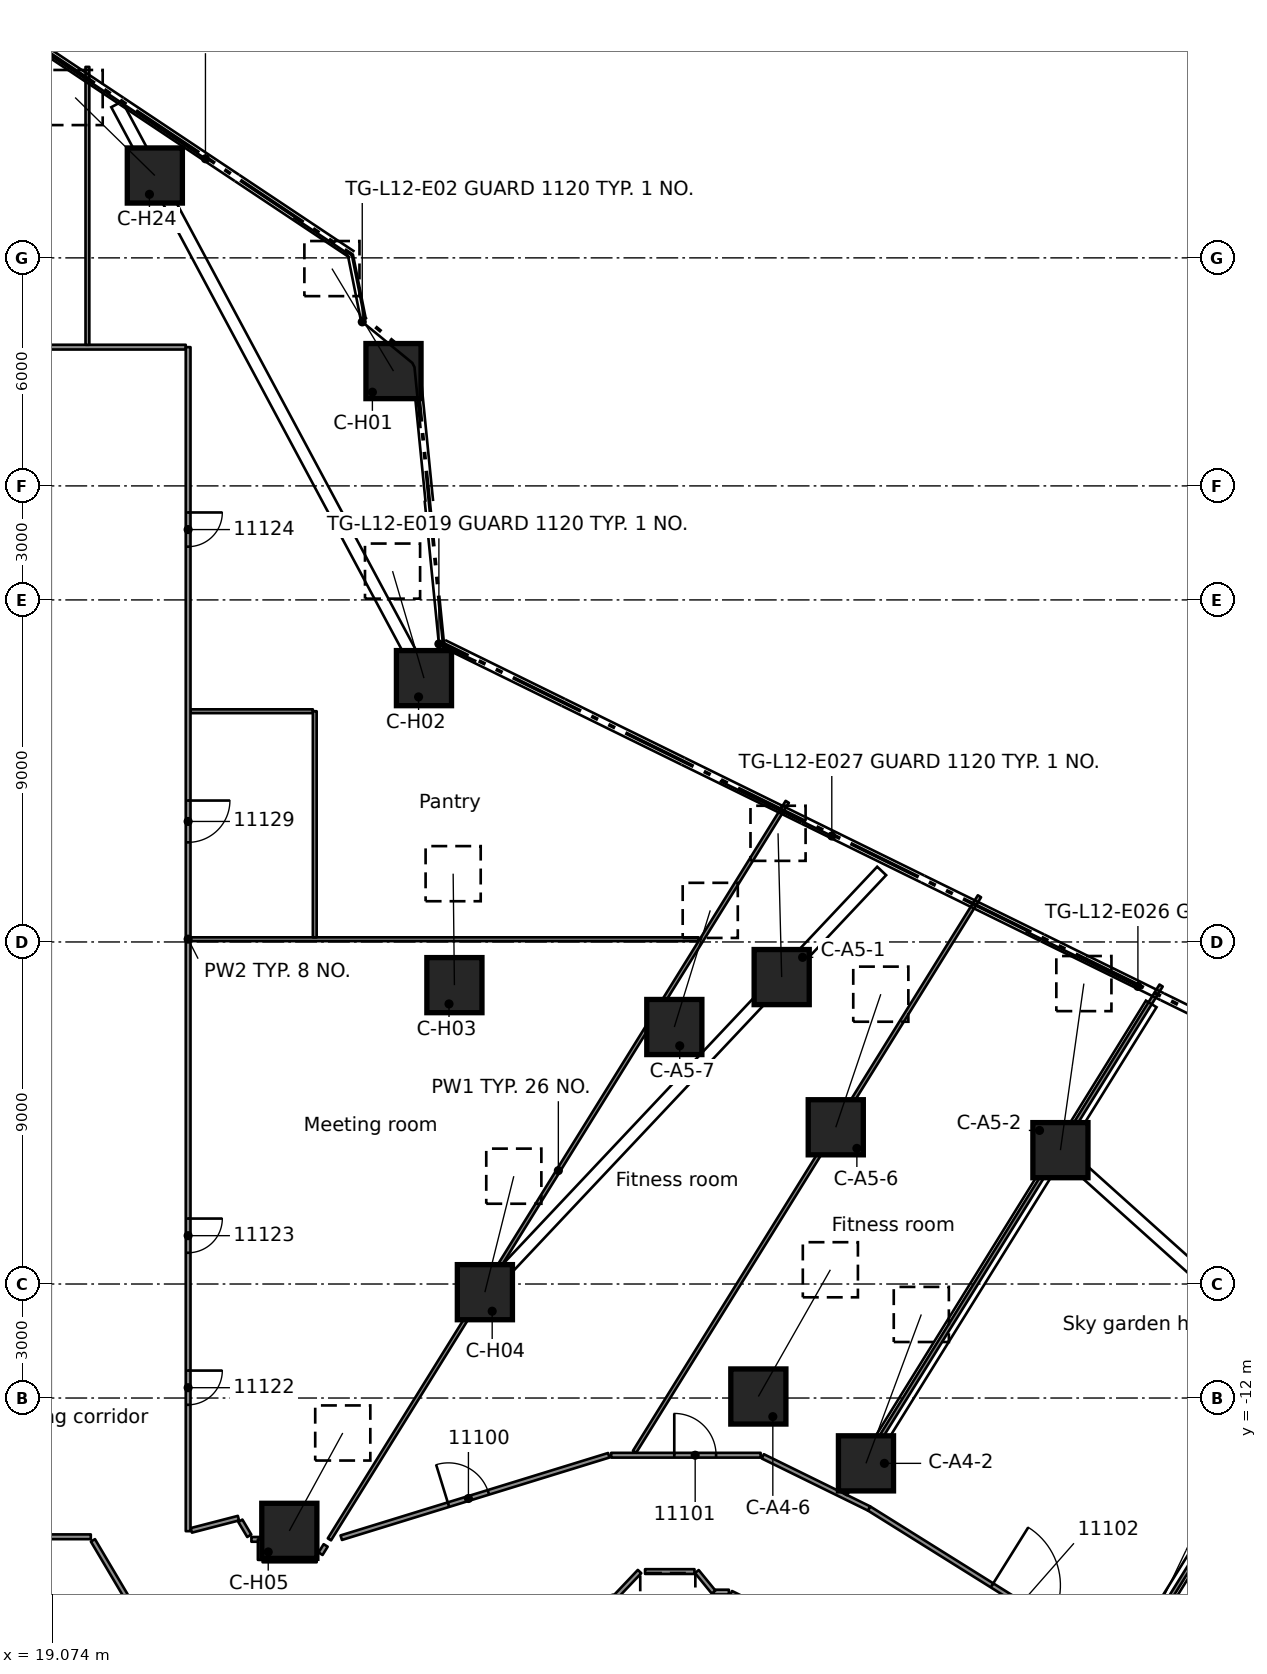
"""IFC4 building model, lengths in metres.
Left out: names, types, materials, properties, quantities, classifications, styles, units other than length and angle.
Written with IfcOpenShell. Run it as: python <this file> out.ifc"""

import sys

from ifc_helpers import new_model, si_unit, direction, frame, frame_2d, origin, origin_2d, place, context, subcontext, project, spatial, rectangle, extrude, element, fill, save


model = new_model("IFC4")
c1 = context("Model", 3, precision=1e-05, world=origin(), true_north=direction((0.0, 1.0)))
c2 = subcontext(c1, "Body", "Model", "MODEL_VIEW")
j1 = project(units=[si_unit("LENGTHUNIT", "METRE"), si_unit("PLANEANGLEUNIT", "RADIAN")], contexts=[c1])
p1 = place(None, origin())
s1 = spatial("IfcSite", under=j1, at=p1, CompositionType="ELEMENT")
p2 = place(p1, origin())
s2 = spatial("IfcBuilding", under=s1, at=p2, CompositionType="ELEMENT")
p3 = place(p2, frame((0.0, 0.0, 54.8)))
s3 = spatial("IfcBuildingStorey", under=s2, at=p3, CompositionType="ELEMENT", Elevation=54.8)
p4 = place(p3, frame((32.539, -20.201, 0.591), z_axis=(0.561988017013, 0.590152683579, 0.579559555869), x_axis=(-0.724176021498, 0.689615175215, 0.0)))
e1 = element("IfcColumn", 1, at=p4, inside=s3, PredefinedType="COLUMN", context=c2, shape_type="SweptSolid", body=[
    extrude(rectangle(XDim=1.45, YDim=1.45, at=origin_2d()), origin(), (0.0, 0.0, 1.0), 4.863),
])
p5 = place(p3, frame((40.487, -13.719, 0.603), z_axis=(0.289589157481, 0.779229845617, 0.55582278432), x_axis=(-0.937362069968, 0.348356641656, 0.0)))
e2 = element("IfcColumn", 2, at=p5, inside=s3, PredefinedType="COLUMN", context=c2, shape_type="SweptSolid", body=[
    extrude(rectangle(XDim=1.45, YDim=1.45, at=origin_2d()), origin(), (0.0, 0.0, 1.0), 5.028),
])
p6 = place(p3, frame((47.822, -18.272, 0.637), z_axis=(0.380217041429, 0.791847782589, 0.47792477506), x_axis=(-0.901465266599, 0.432851444626, 0.0)))
e3 = element("IfcColumn", 3, at=p6, inside=s3, PredefinedType="COLUMN", context=c2, shape_type="SweptSolid", body=[
    extrude(rectangle(XDim=1.45, YDim=1.45, at=origin_2d()), origin(), (0.0, 0.0, 1.0), 5.705),
])
p7 = place(p3, frame((37.655, -11.96, 0.583), z_axis=(0.397363899907, 0.699303127123, 0.594202884079), x_axis=(-0.86943915975, 0.494040026206, 0.0)))
e4 = element("IfcColumn", 4, at=p7, inside=s3, PredefinedType="COLUMN", context=c2, shape_type="SweptSolid", body=[
    extrude(rectangle(XDim=1.45, YDim=1.45, at=origin_2d()), origin(), (0.0, 0.0, 1.0), 4.769),
])
p8 = place(p3, frame((38.269, -0.924, 0.58), z_axis=(-0.020278232031, 0.799519606433, 0.600297586398), x_axis=(-0.999678513697, -0.025354866465, 0.0)))
e5 = element("IfcColumn", 5, at=p8, inside=s3, PredefinedType="COLUMN", context=c2, shape_type="SweptSolid", body=[
    extrude(rectangle(XDim=1.45, YDim=1.45, at=origin_2d()), origin(), (0.0, 0.0, 1.0), 4.731),
])
p9 = place(p3, frame((45.604, -5.478, 0.615), z_axis=(0.118141081309, 0.839329969429, 0.530629708295), x_axis=(-0.990238625022, 0.139382443348, 0.0)))
e6 = element("IfcColumn", 6, at=p9, inside=s3, PredefinedType="COLUMN", context=c2, shape_type="SweptSolid", body=[
    extrude(rectangle(XDim=1.45, YDim=1.45, at=origin_2d()), origin(), (0.0, 0.0, 1.0), 5.222),
])
p10 = place(p3, frame((39.692, -4.876, 0.574), z_axis=(0.253806770761, 0.75002149151, 0.610778098322), x_axis=(-0.947233862159, 0.320543305, 0.0)))
e7 = element("IfcColumn", 7, at=p10, inside=s3, PredefinedType="COLUMN", context=c2, shape_type="SweptSolid", body=[
    extrude(rectangle(XDim=1.45, YDim=1.45, at=origin_2d()), origin(), (0.0, 0.0, 1.0), 4.669),
])
p11 = place(p3, frame((35.444, -2.238, 0.536), z_axis=(0.217391389065, 0.706156886805, 0.673857132616), x_axis=(-0.955736259088, 0.294224749238, 0.0)))
e8 = element("IfcColumn", 8, at=p11, inside=s3, PredefinedType="COLUMN", context=c2, shape_type="SweptSolid", body=[
    extrude(rectangle(XDim=1.45, YDim=1.45, at=origin_2d()), origin(), (0.0, 0.0, 1.0), 4.346),
])
p12 = place(p3, frame((28.054, 15.021, 0.53), z_axis=(-0.376150796059, 0.626275485165, 0.682854007315), x_axis=(-0.857260034443, -0.514883708566, 0.0)))
e9 = element("IfcColumn", 9, at=p12, inside=s3, PredefinedType="COLUMN", context=c2, shape_type="SweptSolid", body=[
    extrude(rectangle(XDim=1.45, YDim=1.45, at=origin_2d()), origin(), (0.0, 0.0, 1.0), 4.306),
])
p13 = place(p3, frame((28.856, 6.942, 0.509), z_axis=(-0.197598545942, 0.672955189678, 0.712801604464), x_axis=(-0.959492559791, -0.281733966191, 0.0)))
e10 = element("IfcColumn", 10, at=p13, inside=s3, PredefinedType="COLUMN", context=c2, shape_type="SweptSolid", body=[
    extrude(rectangle(XDim=1.45, YDim=1.45, at=origin_2d()), origin(), (0.0, 0.0, 1.0), 4.185),
])
p14 = place(p3, frame((29.657, -1.136, 0.508), z_axis=(-0.007877610375, 0.701048970737, 0.713069620643), x_axis=(-0.999936872126, -0.011236180934, 0.0)))
e11 = element("IfcColumn", 11, at=p14, inside=s3, PredefinedType="COLUMN", context=c2, shape_type="SweptSolid", body=[
    extrude(rectangle(XDim=1.45, YDim=1.45, at=origin_2d()), origin(), (0.0, 0.0, 1.0), 4.184),
])
p15 = place(p3, frame((30.459, -9.215, 0.53), z_axis=(0.176721352289, 0.708756376313, 0.682959707948), x_axis=(-0.970292981686, 0.241932903281, 0.0)))
e12 = element("IfcColumn", 12, at=p15, inside=s3, PredefinedType="COLUMN", context=c2, shape_type="SweptSolid", body=[
    extrude(rectangle(XDim=1.45, YDim=1.45, at=origin_2d()), origin(), (0.0, 0.0, 1.0), 4.306),
])
p16 = place(p3, frame((25.313, -15.495, 0.508), z_axis=(0.336025835882, 0.61545416164, 0.71295358372), x_axis=(-0.877701520343, 0.479207722379, 0.0)))
e13 = element("IfcColumn", 13, at=p16, inside=s3, PredefinedType="COLUMN", context=c2, shape_type="SweptSolid", body=[
    extrude(rectangle(XDim=1.45, YDim=1.45, at=origin_2d()), origin(), (0.0, 0.0, 1.0), 4.184),
])
p17 = place(p3, frame((21.774, 20.167, 0.508), z_axis=(-0.501160289027, 0.490424057431, 0.712967466716), x_axis=(-0.699409692761, -0.714720981693, 0.0)))
e14 = element("IfcColumn", 14, at=p17, inside=s3, PredefinedType="COLUMN", context=c2, shape_type="SweptSolid", body=[
    extrude(rectangle(XDim=1.45, YDim=1.45, at=origin_2d()), origin(), (0.0, 0.0, 1.0), 4.184),
])
p18 = place(p3, frame((20.145, -15.745, 0.0), z_axis=(0.0, 0.0, 1.0), x_axis=(0.509399422691, -0.860530201772, 0.0)))
e15 = element("IfcWall", 15, at=p18, inside=s3, PredefinedType="PARTITIONING", context=c2, shape_type="SweptSolid", body=[
    extrude(rectangle(XDim=3.571, YDim=0.125, at=frame_2d((1.786, 0.0))), origin(), (0.0, 0.0, 1.0), 3.58),
])
p19 = place(p3, frame((24.024, -15.23, 0.0), z_axis=(0.0, 0.0, 1.0), x_axis=(0.511446511309, -0.859315114536, 0.0)))
e16 = element("IfcWall", 16, at=p19, inside=s3, PredefinedType="PARTITIONING", context=c2, shape_type="SweptSolid", body=[
    extrude(rectangle(XDim=0.46, YDim=0.125, at=frame_2d((0.23, 0.0))), origin(), (0.0, 0.0, 1.0), 3.58),
])
p20 = place(p3, frame((40.567, -14.906, 0.0), z_axis=(0.0, 0.0, 1.0), x_axis=(0.847984152338, -0.530021581998, 0.0)))
e17 = element("IfcWall", 17, at=p20, inside=s3, PredefinedType="PARTITIONING", context=c2, shape_type="SweptSolid", body=[
    extrude(rectangle(XDim=6.784, YDim=0.125, at=frame_2d((3.392, 0.0))), origin(), (0.0, 0.0, 1.0), 3.58),
])
p21 = place(p20, frame((3.817, 0.0, 0.0)))
e18 = element("IfcOpeningElement", 18, at=p21, cuts=e17, PredefinedType="OPENING", context=c2, shape_type="SweptSolid", body=[
    extrude(rectangle(XDim=1.8, YDim=2.1, at=frame_2d((0.9, 1.05))), frame((0.0, 0.073, 0.0), z_axis=(0.0, -1.0, 0.0), x_axis=(1.0, 0.0, 0.0)), (0.0, 0.0, 1.0), 0.145),
])
p22 = place(p3, frame((36.935, -17.134, 0.0), z_axis=(0.0, 0.0, 1.0), x_axis=(0.897608509631, -0.440793561022, 0.0)))
e19 = element("IfcWall", 19, at=p22, inside=s3, PredefinedType="PARTITIONING", context=c2, shape_type="SweptSolid", body=[
    extrude(rectangle(XDim=1.188, YDim=0.125, at=frame_2d((0.594, 0.0))), origin(), (0.0, 0.0, 1.0), 3.58),
])
p23 = place(p3, frame((37.771, -13.534, 0.0), z_axis=(0.0, 0.0, 1.0), x_axis=(0.897726238761, -0.440553742738, 0.0)))
e20 = element("IfcWall", 20, at=p23, inside=s3, PredefinedType="PARTITIONING", context=c2, shape_type="SweptSolid", body=[
    extrude(rectangle(XDim=3.115, YDim=0.125, at=frame_2d((1.557, 0.0))), origin(), (0.0, 0.0, 1.0), 3.58),
])
p24 = place(p3, frame((36.477, -17.106, 0.0), z_axis=(0.0, 0.0, 1.0), x_axis=(1.0, 0.0, 0.0)))
e21 = element("IfcWall", 21, at=p24, inside=s3, PredefinedType="PARTITIONING", context=c2, shape_type="SweptSolid", body=[
    extrude(rectangle(XDim=0.402, YDim=0.125, at=frame_2d((0.201, 0.0))), origin(), (0.0, 0.0, 1.0), 3.58),
])
p25 = place(p3, frame((34.674, -16.566, 0.0), z_axis=(0.0, 0.0, 1.0), x_axis=(1.0, 0.0, 0.0)))
e22 = element("IfcWall", 22, at=p25, inside=s3, PredefinedType="PARTITIONING", context=c2, shape_type="SweptSolid", body=[
    extrude(rectangle(XDim=1.3, YDim=0.125, at=frame_2d((0.65, 0.0))), origin(), (0.0, 0.0, 1.0), 3.58),
])
p26 = place(p3, frame((24.61, -16.259, 0.0), z_axis=(0.0, 0.0, 1.0), x_axis=(1.0, 0.0, 0.0)))
e23 = element("IfcWall", 23, at=p26, inside=s3, PredefinedType="PARTITIONING", context=c2, shape_type="SweptSolid", body=[
    extrude(rectangle(XDim=1.423, YDim=0.125, at=frame_2d((0.711, 0.0))), origin(), (0.0, 0.0, 1.0), 3.58),
])
p27 = place(p3, frame((24.315, -15.719, 0.0), z_axis=(0.0, 0.0, 1.0), x_axis=(1.0, 0.0, 0.0)))
e24 = element("IfcWall", 24, at=p27, inside=s3, PredefinedType="PARTITIONING", context=c2, shape_type="SweptSolid", body=[
    extrude(rectangle(XDim=0.233, YDim=0.125, at=frame_2d((0.117, 0.0))), origin(), (0.0, 0.0, 1.0), 3.58),
])
p28 = place(p3, frame((20.089, -15.651, 0.0), z_axis=(0.0, 0.0, 1.0), x_axis=(-1.0, 0.0, 0.0)))
e25 = element("IfcWall", 25, at=p28, inside=s3, PredefinedType="PARTITIONING", context=c2, shape_type="SweptSolid", body=[
    extrude(rectangle(XDim=7.928, YDim=0.125, at=frame_2d((3.964, 0.0))), origin(), (0.0, 0.0, 1.0), 3.58),
])
p29 = place(p28, frame((3.1, 0.0, 0.0)))
e26 = element("IfcOpeningElement", 26, at=p29, cuts=e25, PredefinedType="OPENING", context=c2, shape_type="SweptSolid", body=[
    extrude(rectangle(XDim=1.8, YDim=2.1, at=frame_2d((0.9, 1.05))), frame((0.0, 0.073, 0.0), z_axis=(0.0, -1.0, 0.0), x_axis=(1.0, 0.0, 0.0)), (0.0, 0.0, 1.0), 0.145),
])
p30 = place(p3, frame((33.782, -13.505, 0.0), z_axis=(0.0, 0.0, 1.0), x_axis=(1.0, 0.0, 0.0)))
e27 = element("IfcWall", 27, at=p30, inside=s3, PredefinedType="PARTITIONING", context=c2, shape_type="SweptSolid", body=[
    extrude(rectangle(XDim=3.933, YDim=0.125, at=frame_2d((1.967, 0.0))), origin(), (0.0, 0.0, 1.0), 3.58),
])
p31 = place(p30, frame((1.66, 0.0, 0.0)))
e28 = element("IfcOpeningElement", 28, at=p31, cuts=e27, PredefinedType="OPENING", context=c2, shape_type="SweptSolid", body=[
    extrude(rectangle(XDim=1.1, YDim=2.1, at=frame_2d((0.55, 1.05))), frame((0.0, 0.073, 0.0), z_axis=(0.0, -1.0, 0.0), x_axis=(1.0, 0.0, 0.0)), (0.0, 0.0, 1.0), 0.145),
])
p32 = place(p3, frame((22.712, 0.072, 0.0), z_axis=(0.0, 0.0, 1.0), x_axis=(1.0, 0.0, 0.0)))
e29 = element("IfcWall", 29, at=p32, inside=s3, PredefinedType="PARTITIONING", context=c2, shape_type="SweptSolid", body=[
    extrude(rectangle(XDim=13.37, YDim=0.1, at=frame_2d((6.685, 0.0))), origin(), (0.0, 0.0, 1.0), 3.58),
])
p33 = place(p3, frame((22.712, 6.071, 0.0), z_axis=(0.0, 0.0, 1.0), x_axis=(1.0, 0.0, 0.0)))
e30 = element("IfcWall", 30, at=p33, inside=s3, PredefinedType="PARTITIONING", context=c2, shape_type="SweptSolid", body=[
    extrude(rectangle(XDim=3.22, YDim=0.1, at=frame_2d((1.61, 0.0))), origin(), (0.0, 0.0, 1.0), 3.58),
])
p34 = place(p3, frame((12.311, 15.651, 0.0), z_axis=(0.0, 0.0, 1.0), x_axis=(1.0, 0.0, 0.0)))
e31 = element("IfcWall", 31, at=p34, inside=s3, PredefinedType="PARTITIONING", context=c2, shape_type="SweptSolid", body=[
    extrude(rectangle(XDim=10.276, YDim=0.125, at=frame_2d((5.138, 0.0))), origin(), (0.0, 0.0, 1.0), 3.58),
])
p35 = place(p3, frame((22.735, -15.482, 0.0), z_axis=(0.0, 0.0, 1.0), x_axis=(0.968031213417, 0.250829762688, 0.0)))
e32 = element("IfcWall", 32, at=p35, inside=s3, PredefinedType="PARTITIONING", context=c2, shape_type="SweptSolid", body=[
    extrude(rectangle(XDim=1.28, YDim=0.125, at=frame_2d((0.64, 0.0))), origin(), (0.0, 0.0, 1.0), 3.58),
])
p36 = place(p3, frame((31.596, -17.928, 0.0), z_axis=(0.0, 0.0, 1.0), x_axis=(0.95559332345, 0.294688649557, 0.0)))
e33 = element("IfcWall", 33, at=p36, inside=s3, PredefinedType="PARTITIONING", context=c2, shape_type="SweptSolid", body=[
    extrude(rectangle(XDim=2.362, YDim=0.125, at=frame_2d((1.181, 0.0))), origin(), (0.0, 0.0, 1.0), 3.58),
])
p37 = place(p3, frame((26.679, -15.675, 0.0), z_axis=(0.0, 0.0, 1.0), x_axis=(0.955672893263, 0.294430502974, 0.0)))
e34 = element("IfcWall", 34, at=p37, inside=s3, PredefinedType="PARTITIONING", context=c2, shape_type="SweptSolid", body=[
    extrude(rectangle(XDim=7.367, YDim=0.125, at=frame_2d((3.683, 0.0))), origin(), (0.0, 0.0, 1.0), 3.58),
])
p38 = place(p37, frame((2.952, 0.0, 0.0)))
e35 = element("IfcOpeningElement", 35, at=p38, cuts=e34, PredefinedType="OPENING", context=c2, shape_type="SweptSolid", body=[
    extrude(rectangle(XDim=1.1, YDim=2.1, at=frame_2d((0.55, 1.05))), frame((0.0, 0.073, 0.0), z_axis=(0.0, -1.0, 0.0), x_axis=(1.0, 0.0, 0.0)), (0.0, 0.0, 1.0), 0.145),
])
p39 = place(p3, frame((33.914, -17.214, 0.0), z_axis=(0.0, 0.0, 1.0), x_axis=(0.68828255524, 0.725442709076, 0.0)))
e36 = element("IfcWall", 36, at=p39, inside=s3, PredefinedType="PARTITIONING", context=c2, shape_type="SweptSolid", body=[
    extrude(rectangle(XDim=0.894, YDim=0.125, at=frame_2d((0.447, 0.0))), origin(), (0.0, 0.0, 1.0), 3.58),
])
p40 = place(p3, frame((47.442, -18.947, 0.0), z_axis=(0.0, 0.0, 1.0), x_axis=(0.527488067466, 0.849562439542, 0.0)))
e37 = element("IfcWall", 37, at=p40, inside=s3, PredefinedType="PARTITIONING", context=c2, shape_type="SweptSolid", body=[
    extrude(rectangle(XDim=16.114, YDim=0.1, at=frame_2d((8.057, 0.0))), origin(), (0.0, 0.0, 1.0), 3.58),
])
p41 = place(p3, frame((39.944, -14.531, 0.0), z_axis=(0.0, 0.0, 1.0), x_axis=(0.527404137303, 0.849614545518, 0.0)))
e38 = element("IfcWall", 38, at=p41, inside=s3, PredefinedType="PARTITIONING", context=c2, shape_type="SweptSolid", body=[
    extrude(rectangle(XDim=15.754, YDim=0.1, at=frame_2d((7.877, 0.0))), origin(), (0.0, 0.0, 1.0), 3.58),
])
p42 = place(p3, frame((34.397, -13.416, 0.0), z_axis=(0.0, 0.0, 1.0), x_axis=(0.527477648144, 0.849568908746, 0.0)))
e39 = element("IfcWall", 39, at=p42, inside=s3, PredefinedType="PARTITIONING", context=c2, shape_type="SweptSolid", body=[
    extrude(rectangle(XDim=17.206, YDim=0.1, at=frame_2d((8.603, 0.0))), origin(), (0.0, 0.0, 1.0), 3.58),
])
p43 = place(p3, frame((26.134, -16.097, 0.0), z_axis=(0.0, 0.0, 1.0), x_axis=(0.52648571084, 0.850183977902, 0.0)))
e40 = element("IfcWall", 40, at=p43, inside=s3, PredefinedType="PARTITIONING", context=c2, shape_type="SweptSolid", body=[
    extrude(rectangle(XDim=0.256, YDim=0.125, at=frame_2d((0.128, 0.0))), origin(), (0.0, 0.0, 1.0), 3.58),
])
p44 = place(p3, frame((26.368, -15.719, 0.0), z_axis=(0.0, 0.0, 1.0), x_axis=(0.527457310134, 0.849581535808, 0.0)))
e41 = element("IfcWall", 41, at=p44, inside=s3, PredefinedType="PARTITIONING", context=c2, shape_type="SweptSolid", body=[
    extrude(rectangle(XDim=22.842, YDim=0.1, at=frame_2d((11.421, 0.0))), origin(), (0.0, 0.0, 1.0), 3.58),
])
p45 = place(p3, frame((36.477, -17.106, 0.0), z_axis=(0.0, 0.0, 1.0), x_axis=(-0.631594931401, 0.775298550643, 0.0)))
e42 = element("IfcWall", 42, at=p45, inside=s3, PredefinedType="PARTITIONING", context=c2, shape_type="SweptSolid", body=[
    extrude(rectangle(XDim=0.697, YDim=0.125, at=frame_2d((0.348, 0.0))), origin(), (0.0, 0.0, 1.0), 3.58),
])
p46 = place(p3, frame((25.982, 0.122, 0.0), z_axis=(0.0, 0.0, 1.0), x_axis=(0.0, 1.0, 0.0)))
e43 = element("IfcWall", 43, at=p46, inside=s3, PredefinedType="PARTITIONING", context=c2, shape_type="SweptSolid", body=[
    extrude(rectangle(XDim=5.949, YDim=0.1, at=frame_2d((2.975, 0.0))), origin(), (0.0, 0.0, 1.0), 3.58),
])
p47 = place(p3, frame((24.548, -16.259, 0.0), z_axis=(0.0, 0.0, 1.0), x_axis=(0.0, 1.0, 0.0)))
e44 = element("IfcWall", 44, at=p47, inside=s3, PredefinedType="PARTITIONING", context=c2, shape_type="SweptSolid", body=[
    extrude(rectangle(XDim=0.54, YDim=0.125, at=frame_2d((0.27, 0.0))), origin(), (0.0, 0.0, 1.0), 3.58),
])
p48 = place(p3, frame((22.65, 15.651, 0.0), z_axis=(0.0, 0.0, 1.0), x_axis=(0.0, -1.0, 0.0)))
e45 = element("IfcWall", 45, at=p48, inside=s3, PredefinedType="PARTITIONING", context=c2, shape_type="SweptSolid", body=[
    extrude(rectangle(XDim=31.154, YDim=0.125, at=frame_2d((15.577, 0.0))), origin(), (0.0, 0.0, 1.0), 3.58),
])
p49 = place(p48, frame((26.929, 0.0, 0.0)))
e46 = element("IfcOpeningElement", 46, at=p49, cuts=e45, PredefinedType="OPENING", context=c2, shape_type="SweptSolid", body=[
    extrude(rectangle(XDim=0.9, YDim=2.1, at=frame_2d((0.45, 1.05))), frame((0.0, 0.073, 0.0), z_axis=(0.0, -1.0, 0.0), x_axis=(1.0, 0.0, 0.0)), (0.0, 0.0, 1.0), 0.145),
])
p50 = place(p48, frame((22.929, 0.0, 0.0)))
e47 = element("IfcOpeningElement", 47, at=p50, cuts=e45, PredefinedType="OPENING", context=c2, shape_type="SweptSolid", body=[
    extrude(rectangle(XDim=0.9, YDim=2.1, at=frame_2d((0.45, 1.05))), frame((0.0, 0.073, 0.0), z_axis=(0.0, -1.0, 0.0), x_axis=(1.0, 0.0, 0.0)), (0.0, 0.0, 1.0), 0.145),
])
p51 = place(p48, frame((4.35, 0.0, 0.0)))
e48 = element("IfcOpeningElement", 48, at=p51, cuts=e45, PredefinedType="OPENING", context=c2, shape_type="SweptSolid", body=[
    extrude(rectangle(XDim=0.9, YDim=2.1, at=frame_2d((0.45, 1.05))), frame((0.0, 0.073, 0.0), z_axis=(0.0, -1.0, 0.0), x_axis=(1.0, 0.0, 0.0)), (0.0, 0.0, 1.0), 0.145),
])
p52 = place(p48, frame((11.93, 0.0, 0.0)))
e49 = element("IfcOpeningElement", 49, at=p52, cuts=e45, PredefinedType="OPENING", context=c2, shape_type="SweptSolid", body=[
    extrude(rectangle(XDim=1.1, YDim=2.1, at=frame_2d((0.55, 1.05))), frame((0.0, 0.073, 0.0), z_axis=(0.0, -1.0, 0.0), x_axis=(1.0, 0.0, 0.0)), (0.0, 0.0, 1.0), 0.145),
])
p53 = place(p3, frame((20.0, 15.713, 0.0), z_axis=(0.0, 0.0, 1.0), x_axis=(0.0, 1.0, 0.0)))
e50 = element("IfcWall", 50, at=p53, inside=s3, PredefinedType="PARTITIONING", context=c2, shape_type="SweptSolid", body=[
    extrude(rectangle(XDim=7.312, YDim=0.1, at=frame_2d((3.656, 0.0))), origin(), (0.0, 0.0, 1.0), 3.58),
])
p54 = place(p38, origin())
e51 = element("IfcDoor", 51, at=p54, inside=s3, OperationType="SINGLE_SWING_LEFT", PredefinedType="DOOR", context=c2, shape_type="SweptSolid", body=[
    extrude(rectangle(XDim=1.1, YDim=2.1, at=frame_2d((0.55, 1.05))), frame((0.0, 0.025, 0.0), z_axis=(0.0, -1.0, 0.0), x_axis=(1.0, 0.0, 0.0)), (0.0, 0.0, 1.0), 0.05),
])
fill(e35, e51)
p55 = place(p31, origin())
e52 = element("IfcDoor", 52, at=p55, inside=s3, OperationType="SINGLE_SWING_RIGHT", PredefinedType="DOOR", context=c2, shape_type="SweptSolid", body=[
    extrude(rectangle(XDim=1.1, YDim=2.1, at=frame_2d((0.55, 1.05))), frame((0.0, 0.025, 0.0), z_axis=(0.0, -1.0, 0.0), x_axis=(1.0, 0.0, 0.0)), (0.0, 0.0, 1.0), 0.05),
])
fill(e28, e52)
p56 = place(p21, origin())
e53 = element("IfcDoor", 53, at=p56, inside=s3, OperationType="DOUBLE_DOOR_SINGLE_SWING", PredefinedType="DOOR", context=c2, shape_type="SweptSolid", body=[
    extrude(rectangle(XDim=1.8, YDim=2.1, at=frame_2d((0.9, 1.05))), frame((0.0, 0.025, 0.0), z_axis=(0.0, -1.0, 0.0), x_axis=(1.0, 0.0, 0.0)), (0.0, 0.0, 1.0), 0.05),
])
fill(e18, e53)
p57 = place(p49, origin())
e54 = element("IfcDoor", 54, at=p57, inside=s3, OperationType="SINGLE_SWING_RIGHT", PredefinedType="DOOR", context=c2, shape_type="SweptSolid", body=[
    extrude(rectangle(XDim=0.9, YDim=2.1, at=frame_2d((0.45, 1.05))), frame((0.0, 0.025, 0.0), z_axis=(0.0, -1.0, 0.0), x_axis=(1.0, 0.0, 0.0)), (0.0, 0.0, 1.0), 0.05),
])
fill(e46, e54)
p58 = place(p50, origin())
e55 = element("IfcDoor", 55, at=p58, inside=s3, OperationType="SINGLE_SWING_RIGHT", PredefinedType="DOOR", context=c2, shape_type="SweptSolid", body=[
    extrude(rectangle(XDim=0.9, YDim=2.1, at=frame_2d((0.45, 1.05))), frame((0.0, 0.025, 0.0), z_axis=(0.0, -1.0, 0.0), x_axis=(1.0, 0.0, 0.0)), (0.0, 0.0, 1.0), 0.05),
])
fill(e47, e55)
p59 = place(p51, origin())
e56 = element("IfcDoor", 56, at=p59, inside=s3, OperationType="SINGLE_SWING_LEFT", PredefinedType="DOOR", context=c2, shape_type="SweptSolid", body=[
    extrude(rectangle(XDim=0.9, YDim=2.1, at=frame_2d((0.45, 1.05))), frame((0.0, 0.025, 0.0), z_axis=(0.0, -1.0, 0.0), x_axis=(1.0, 0.0, 0.0)), (0.0, 0.0, 1.0), 0.05),
])
fill(e48, e56)
p60 = place(p52, origin())
e57 = element("IfcDoor", 57, at=p60, inside=s3, OperationType="SINGLE_SWING_LEFT", PredefinedType="DOOR", context=c2, shape_type="SweptSolid", body=[
    extrude(rectangle(XDim=1.1, YDim=2.1, at=frame_2d((0.55, 1.05))), frame((0.0, 0.025, 0.0), z_axis=(0.0, -1.0, 0.0), x_axis=(1.0, 0.0, 0.0)), (0.0, 0.0, 1.0), 0.05),
])
fill(e49, e57)
save(model, sys.argv[1])
